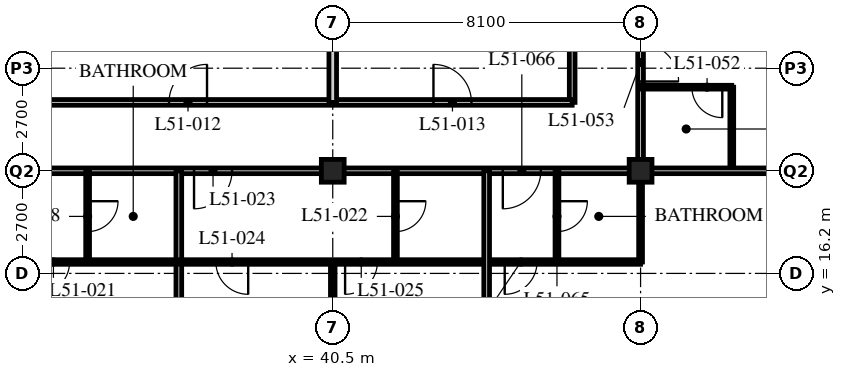
"""IFC4 building model, lengths in metres.
Left out: names, types, materials, properties, quantities, classifications, styles, units other than length and angle.
Written with IfcOpenShell. Run it as: python <this file> out.ifc"""

import sys

from ifc_helpers import new_model, si_unit, direction, frame, frame_2d, origin, origin_2d, place, context, subcontext, project, spatial, rectangle, hollow_rectangle, extrude, element, fill, save


model = new_model("IFC4")
c1 = context("Model", 3, precision=1e-05, world=origin(), true_north=direction((0.0, 1.0)))
c2 = subcontext(c1, "Body", "Model", "MODEL_VIEW")
j1 = project(units=[si_unit("LENGTHUNIT", "METRE"), si_unit("PLANEANGLEUNIT", "RADIAN")], contexts=[c1])
p1 = place(None, origin())
s1 = spatial("IfcSite", under=j1, at=p1, CompositionType="ELEMENT")
p2 = place(p1, origin())
s2 = spatial("IfcBuilding", under=s1, at=p2, CompositionType="ELEMENT")
p3 = place(p2, frame((0.0, 0.0, 199.2)))
s3 = spatial("IfcBuildingStorey", under=s2, at=p3, CompositionType="ELEMENT", Elevation=199.2)
for number, where, z_axis, x_axis in (
    (1, (40.5, 18.9, 0.0), (0.0, 0.0, 1.0), (1.0, 0.0, 0.0)),
    (2, (48.6, 18.9, 0.0), (0.0, 0.0, 1.0), (1.0, 0.0, 0.0)),
):
    element("IfcColumn", number, at=place(p3, frame(where, z_axis=z_axis, x_axis=x_axis)), inside=s3, PredefinedType="COLUMN", context=c2, shape_type="SweptSolid", body=[
        extrude(hollow_rectangle(XDim=0.6, YDim=0.6, WallThickness=0.05, at=origin_2d()), origin(), (0.0, 0.0, 1.0), 3.6),
    ])
p4 = place(p3, frame((8.1, 18.9, 0.0), z_axis=(0.0, 0.0, 1.0), x_axis=(1.0, 0.0, 0.0)))
e3 = element("IfcWall", 3, at=p4, inside=s3, PredefinedType="PARTITIONING", context=c2, shape_type="SweptSolid", body=[
    extrude(rectangle(XDim=40.5, YDim=0.15, at=frame_2d((20.25, 0.0))), origin(), (0.0, 0.0, 1.0), 2.778),
])
p5 = place(p4, frame((4.45, 0.0, 0.0)))
e4 = element("IfcOpeningElement", 4, at=p5, cuts=e3, PredefinedType="OPENING", context=c2, shape_type="SweptSolid", body=[
    extrude(rectangle(XDim=1.0, YDim=2.1, at=frame_2d((0.5, 1.05))), frame((0.0, 0.085, 0.0), z_axis=(0.0, -1.0, 0.0), x_axis=(1.0, 0.0, 0.0)), (0.0, 0.0, 1.0), 0.17),
])
p6 = place(p4, frame((17.1, 0.0, 0.0)))
e5 = element("IfcOpeningElement", 5, at=p6, cuts=e3, PredefinedType="OPENING", context=c2, shape_type="SweptSolid", body=[
    extrude(rectangle(XDim=1.0, YDim=2.1, at=frame_2d((0.5, 1.05))), frame((0.0, 0.085, 0.0), z_axis=(0.0, -1.0, 0.0), x_axis=(1.0, 0.0, 0.0)), (0.0, 0.0, 1.0), 0.17),
])
p7 = place(p4, frame((28.75, 0.0, 0.0)))
e6 = element("IfcOpeningElement", 6, at=p7, cuts=e3, PredefinedType="OPENING", context=c2, shape_type="SweptSolid", body=[
    extrude(rectangle(XDim=1.0, YDim=2.1, at=frame_2d((0.5, 1.05))), frame((0.0, 0.085, 0.0), z_axis=(0.0, -1.0, 0.0), x_axis=(1.0, 0.0, 0.0)), (0.0, 0.0, 1.0), 0.17),
])
p8 = place(p4, frame((2.625, 0.0, 0.0)))
e7 = element("IfcOpeningElement", 7, at=p8, cuts=e3, PredefinedType="OPENING", context=c2, shape_type="SweptSolid", body=[
    extrude(rectangle(XDim=1.0, YDim=2.1, at=frame_2d((0.5, 1.05))), frame((0.0, 0.085, 0.0), z_axis=(0.0, -1.0, 0.0), x_axis=(1.0, 0.0, 0.0)), (0.0, 0.0, 1.0), 0.17),
])
p9 = place(p4, frame((36.875, 0.0, 0.0)))
e8 = element("IfcOpeningElement", 8, at=p9, cuts=e3, PredefinedType="OPENING", context=c2, shape_type="SweptSolid", body=[
    extrude(rectangle(XDim=1.0, YDim=2.1, at=frame_2d((0.5, 1.05))), frame((0.0, 0.085, 0.0), z_axis=(0.0, -1.0, 0.0), x_axis=(1.0, 0.0, 0.0)), (0.0, 0.0, 1.0), 0.17),
])
p10 = place(p3, frame((48.6, 18.9, 0.0), z_axis=(0.0, 0.0, 1.0), x_axis=(0.0, 1.0, 0.0)))
e9 = element("IfcWall", 9, at=p10, inside=s3, PredefinedType="PARTITIONING", context=c2, shape_type="SweptSolid", body=[
    extrude(rectangle(XDim=24.3, YDim=0.15, at=frame_2d((12.15, 0.0))), origin(), (0.0, 0.0, 1.0), 2.778),
])
p11 = place(p10, frame((2.35, 0.0, 0.0)))
e10 = element("IfcOpeningElement", 10, at=p11, cuts=e9, PredefinedType="OPENING", context=c2, shape_type="SweptSolid", body=[
    extrude(rectangle(XDim=1.0, YDim=2.1, at=frame_2d((0.5, 1.05))), frame((0.0, 0.085, 0.0), z_axis=(0.0, -1.0, 0.0), x_axis=(1.0, 0.0, 0.0)), (0.0, 0.0, 1.0), 0.17),
])
p12 = place(p10, frame((4.75, 0.0, 0.0)))
e11 = element("IfcOpeningElement", 11, at=p12, cuts=e9, PredefinedType="OPENING", context=c2, shape_type="SweptSolid", body=[
    extrude(rectangle(XDim=1.0, YDim=2.1, at=frame_2d((0.5, 1.05))), frame((0.0, 0.085, 0.0), z_axis=(0.0, -1.0, 0.0), x_axis=(1.0, 0.0, 0.0)), (0.0, 0.0, 1.0), 0.17),
])
p13 = place(p10, frame((9.0, 0.0, 0.0)))
e12 = element("IfcOpeningElement", 12, at=p13, cuts=e9, PredefinedType="OPENING", context=c2, shape_type="SweptSolid", body=[
    extrude(rectangle(XDim=1.0, YDim=2.1, at=frame_2d((0.5, 1.05))), frame((0.0, 0.085, 0.0), z_axis=(0.0, -1.0, 0.0), x_axis=(1.0, 0.0, 0.0)), (0.0, 0.0, 1.0), 0.17),
])
p14 = place(p3, frame((46.8, 20.7, 0.0), z_axis=(0.0, 0.0, 1.0), x_axis=(0.0, 1.0, 0.0)))
e13 = element("IfcWall", 13, at=p14, inside=s3, PredefinedType="PARTITIONING", context=c2, shape_type="SweptSolid", body=[
    extrude(rectangle(XDim=19.8, YDim=0.15, at=frame_2d((9.9, 0.0))), origin(), (0.0, 0.0, 1.0), 3.39),
])
p15 = place(p14, frame((4.052, 0.0, 0.0)))
e14 = element("IfcOpeningElement", 14, at=p15, cuts=e13, PredefinedType="OPENING", context=c2, shape_type="SweptSolid", body=[
    extrude(rectangle(XDim=1.0, YDim=2.1, at=frame_2d((0.5, 1.05))), frame((0.0, 0.085, 0.0), z_axis=(0.0, -1.0, 0.0), x_axis=(1.0, 0.0, 0.0)), (0.0, 0.0, 1.0), 0.17),
])
p16 = place(p14, frame((8.102, 0.0, 0.0)))
e15 = element("IfcOpeningElement", 15, at=p16, cuts=e13, PredefinedType="OPENING", context=c2, shape_type="SweptSolid", body=[
    extrude(rectangle(XDim=1.0, YDim=2.1, at=frame_2d((0.5, 1.05))), frame((0.0, 0.085, 0.0), z_axis=(0.0, -1.0, 0.0), x_axis=(1.0, 0.0, 0.0)), (0.0, 0.0, 1.0), 0.17),
])
p17 = place(p14, frame((13.502, 0.0, 0.0)))
e16 = element("IfcOpeningElement", 16, at=p17, cuts=e13, PredefinedType="OPENING", context=c2, shape_type="SweptSolid", body=[
    extrude(rectangle(XDim=1.0, YDim=2.1, at=frame_2d((0.5, 1.05))), frame((0.0, 0.085, 0.0), z_axis=(0.0, -1.0, 0.0), x_axis=(1.0, 0.0, 0.0)), (0.0, 0.0, 1.0), 0.17),
])
p18 = place(p14, frame((17.552, 0.0, 0.0)))
e17 = element("IfcOpeningElement", 17, at=p18, cuts=e13, PredefinedType="OPENING", context=c2, shape_type="SweptSolid", body=[
    extrude(rectangle(XDim=1.0, YDim=2.1, at=frame_2d((0.5, 1.05))), frame((0.0, 0.085, 0.0), z_axis=(0.0, -1.0, 0.0), x_axis=(1.0, 0.0, 0.0)), (0.0, 0.0, 1.0), 0.17),
])
p19 = place(p3, frame((29.56, 20.7, 0.0), z_axis=(0.0, 0.0, 1.0), x_axis=(1.0, 0.0, 0.0)))
e18 = element("IfcWall", 18, at=p19, inside=s3, PredefinedType="PARTITIONING", context=c2, shape_type="SweptSolid", body=[
    extrude(rectangle(XDim=17.24, YDim=0.15, at=frame_2d((8.62, 0.0))), origin(), (0.0, 0.0, 1.0), 3.39),
])
p20 = place(p19, frame((1.157, 0.0, 0.0)))
e19 = element("IfcOpeningElement", 19, at=p20, cuts=e18, PredefinedType="OPENING", context=c2, shape_type="SweptSolid", body=[
    extrude(rectangle(XDim=1.0, YDim=2.1, at=frame_2d((0.5, 1.05))), frame((0.0, 0.085, 0.0), z_axis=(0.0, -1.0, 0.0), x_axis=(1.0, 0.0, 0.0)), (0.0, 0.0, 1.0), 0.17),
])
p21 = place(p19, frame((6.632, 0.0, 0.0)))
e20 = element("IfcOpeningElement", 20, at=p21, cuts=e18, PredefinedType="OPENING", context=c2, shape_type="SweptSolid", body=[
    extrude(rectangle(XDim=1.0, YDim=2.1, at=frame_2d((0.5, 1.05))), frame((0.0, 0.085, 0.0), z_axis=(0.0, -1.0, 0.0), x_axis=(1.0, 0.0, 0.0)), (0.0, 0.0, 1.0), 0.17),
])
p22 = place(p19, frame((13.59, 0.0, 0.0)))
e21 = element("IfcOpeningElement", 21, at=p22, cuts=e18, PredefinedType="OPENING", context=c2, shape_type="SweptSolid", body=[
    extrude(rectangle(XDim=1.0, YDim=2.1, at=frame_2d((0.5, 1.05))), frame((0.0, 0.085, 0.0), z_axis=(0.0, -1.0, 0.0), x_axis=(1.0, 0.0, 0.0)), (0.0, 0.0, 1.0), 0.17),
])
p23 = place(p3, frame((40.5, 20.7, 0.0), z_axis=(0.0, 0.0, 1.0), x_axis=(0.0, 1.0, 0.0)))
e22 = element("IfcWall", 22, at=p23, inside=s3, PredefinedType="SOLIDWALL", context=c2, shape_type="SweptSolid", body=[
    extrude(rectangle(XDim=3.6, YDim=0.2, at=frame_2d((1.8, 0.0))), origin(), (0.0, 0.0, 1.0), 2.778),
])
p24 = place(p3, frame((34.05, 18.9, 0.0), z_axis=(0.0, 0.0, 1.0), x_axis=(0.0, -1.0, 0.0)))
e23 = element("IfcWall", 23, at=p24, inside=s3, PredefinedType="PARTITIONING", context=c2, shape_type="SweptSolid", body=[
    extrude(rectangle(XDim=2.4, YDim=0.1, at=frame_2d((1.2, 0.0))), origin(), (0.0, 0.0, 1.0), 3.39),
])
p25 = place(p24, frame((0.8, 0.0, 0.0)))
e24 = element("IfcOpeningElement", 24, at=p25, cuts=e23, PredefinedType="OPENING", context=c2, shape_type="SweptSolid", body=[
    extrude(rectangle(XDim=0.8, YDim=2.1, at=frame_2d((0.4, 1.05))), frame((0.0, 0.06, 0.0), z_axis=(0.0, -1.0, 0.0), x_axis=(1.0, 0.0, 0.0)), (0.0, 0.0, 1.0), 0.12),
])
p26 = place(p3, frame((36.45, 18.9, 0.0), z_axis=(0.0, 0.0, 1.0), x_axis=(0.0, -1.0, 0.0)))
e25 = element("IfcWall", 25, at=p26, inside=s3, PredefinedType="PARTITIONING", context=c2, shape_type="SweptSolid", body=[
    extrude(rectangle(XDim=7.8, YDim=0.15, at=frame_2d((3.9, 0.0))), origin(), (0.0, 0.0, 1.0), 3.39),
])
p27 = place(p3, frame((42.15, 18.9, 0.0), z_axis=(0.0, 0.0, 1.0), x_axis=(0.0, -1.0, 0.0)))
e26 = element("IfcWall", 26, at=p27, inside=s3, PredefinedType="PARTITIONING", context=c2, shape_type="SweptSolid", body=[
    extrude(rectangle(XDim=2.4, YDim=0.1, at=frame_2d((1.2, 0.0))), origin(), (0.0, 0.0, 1.0), 3.39),
])
p28 = place(p27, frame((0.8, 0.0, 0.0)))
e27 = element("IfcOpeningElement", 27, at=p28, cuts=e26, PredefinedType="OPENING", context=c2, shape_type="SweptSolid", body=[
    extrude(rectangle(XDim=0.8, YDim=2.1, at=frame_2d((0.4, 1.05))), frame((0.0, 0.06, 0.0), z_axis=(0.0, -1.0, 0.0), x_axis=(1.0, 0.0, 0.0)), (0.0, 0.0, 1.0), 0.12),
])
p29 = place(p3, frame((40.5, 16.5, 0.0), z_axis=(0.0, 0.0, 1.0), x_axis=(0.0, -1.0, 0.0)))
e28 = element("IfcWall", 28, at=p29, inside=s3, PredefinedType="PARTITIONING", context=c2, shape_type="SweptSolid", body=[
    extrude(rectangle(XDim=5.4, YDim=0.12, at=frame_2d((2.7, 0.0))), origin(), (0.0, 0.0, 1.0), 2.778),
])
p30 = place(p3, frame((51.0, 18.9, 0.0), z_axis=(0.0, 0.0, 1.0), x_axis=(0.0, 1.0, 0.0)))
e29 = element("IfcWall", 29, at=p30, inside=s3, PredefinedType="PARTITIONING", context=c2, shape_type="SweptSolid", body=[
    extrude(rectangle(XDim=2.2, YDim=0.1, at=frame_2d((1.1, 0.0))), origin(), (0.0, 0.0, 1.0), 3.39),
])
p31 = place(p3, frame((48.6, 21.1, 0.0), z_axis=(0.0, 0.0, 1.0), x_axis=(1.0, 0.0, 0.0)))
e30 = element("IfcWall", 30, at=p31, inside=s3, PredefinedType="PARTITIONING", context=c2, shape_type="SweptSolid", body=[
    extrude(rectangle(XDim=2.4, YDim=0.1, at=frame_2d((1.2, 0.0))), origin(), (0.0, 0.0, 1.0), 3.39),
])
p32 = place(p31, frame((1.35, 0.0, 0.0)))
e31 = element("IfcOpeningElement", 31, at=p32, cuts=e30, PredefinedType="OPENING", context=c2, shape_type="SweptSolid", body=[
    extrude(rectangle(XDim=0.8, YDim=2.1, at=frame_2d((0.4, 1.05))), frame((0.0, 0.06, 0.0), z_axis=(0.0, -1.0, 0.0), x_axis=(1.0, 0.0, 0.0)), (0.0, 0.0, 1.0), 0.12),
])
p33 = place(p3, frame((8.1, 16.5, 0.0), z_axis=(0.0, 0.0, 1.0), x_axis=(1.0, 0.0, 0.0)))
e32 = element("IfcWall", 32, at=p33, inside=s3, PredefinedType="PARTITIONING", context=c2, shape_type="SweptSolid", body=[
    extrude(rectangle(XDim=40.5, YDim=0.12, at=frame_2d((20.25, 0.0))), origin(), (0.0, 0.0, 1.0), 3.39),
])
p34 = place(p33, frame((5.025, 0.0, 0.0)))
e33 = element("IfcOpeningElement", 33, at=p34, cuts=e32, PredefinedType="OPENING", context=c2, shape_type="SweptSolid", body=[
    extrude(rectangle(XDim=0.85, YDim=2.1, at=frame_2d((0.425, 1.05))), frame((0.0, 0.07, 0.0), z_axis=(0.0, -1.0, 0.0), x_axis=(1.0, 0.0, 0.0)), (0.0, 0.0, 1.0), 0.14),
])
p35 = place(p33, frame((12.475, 0.0, 0.0)))
e34 = element("IfcOpeningElement", 34, at=p35, cuts=e32, PredefinedType="OPENING", context=c2, shape_type="SweptSolid", body=[
    extrude(rectangle(XDim=0.85, YDim=2.1, at=frame_2d((0.425, 1.05))), frame((0.0, 0.07, 0.0), z_axis=(0.0, -1.0, 0.0), x_axis=(1.0, 0.0, 0.0)), (0.0, 0.0, 1.0), 0.14),
])
p36 = place(p33, frame((17.175, 0.0, 0.0)))
e35 = element("IfcOpeningElement", 35, at=p36, cuts=e32, PredefinedType="OPENING", context=c2, shape_type="SweptSolid", body=[
    extrude(rectangle(XDim=0.85, YDim=2.1, at=frame_2d((0.425, 1.05))), frame((0.0, 0.07, 0.0), z_axis=(0.0, -1.0, 0.0), x_axis=(1.0, 0.0, 0.0)), (0.0, 0.0, 1.0), 0.14),
])
p37 = place(p33, frame((24.625, 0.0, 0.0)))
e36 = element("IfcOpeningElement", 36, at=p37, cuts=e32, PredefinedType="OPENING", context=c2, shape_type="SweptSolid", body=[
    extrude(rectangle(XDim=0.85, YDim=2.1, at=frame_2d((0.425, 1.05))), frame((0.0, 0.07, 0.0), z_axis=(0.0, -1.0, 0.0), x_axis=(1.0, 0.0, 0.0)), (0.0, 0.0, 1.0), 0.14),
])
p38 = place(p33, frame((29.325, 0.0, 0.0)))
e37 = element("IfcOpeningElement", 37, at=p38, cuts=e32, PredefinedType="OPENING", context=c2, shape_type="SweptSolid", body=[
    extrude(rectangle(XDim=0.85, YDim=2.1, at=frame_2d((0.425, 1.05))), frame((0.0, 0.07, 0.0), z_axis=(0.0, -1.0, 0.0), x_axis=(1.0, 0.0, 0.0)), (0.0, 0.0, 1.0), 0.14),
])
p39 = place(p33, frame((32.725, 0.0, 0.0)))
e38 = element("IfcOpeningElement", 38, at=p39, cuts=e32, PredefinedType="OPENING", context=c2, shape_type="SweptSolid", body=[
    extrude(rectangle(XDim=0.85, YDim=2.1, at=frame_2d((0.425, 1.05))), frame((0.0, 0.07, 0.0), z_axis=(0.0, -1.0, 0.0), x_axis=(1.0, 0.0, 0.0)), (0.0, 0.0, 1.0), 0.14),
])
p40 = place(p33, frame((2.725, 0.0, 0.0)))
e39 = element("IfcOpeningElement", 39, at=p40, cuts=e32, PredefinedType="OPENING", context=c2, shape_type="SweptSolid", body=[
    extrude(rectangle(XDim=0.85, YDim=2.1, at=frame_2d((0.425, 1.05))), frame((0.0, 0.07, 0.0), z_axis=(0.0, -1.0, 0.0), x_axis=(1.0, 0.0, 0.0)), (0.0, 0.0, 1.0), 0.14),
])
p41 = place(p33, frame((36.925, 0.0, 0.0)))
e40 = element("IfcOpeningElement", 40, at=p41, cuts=e32, PredefinedType="OPENING", context=c2, shape_type="SweptSolid", body=[
    extrude(rectangle(XDim=0.85, YDim=2.1, at=frame_2d((0.425, 1.05))), frame((0.0, 0.07, 0.0), z_axis=(0.0, -1.0, 0.0), x_axis=(1.0, 0.0, 0.0)), (0.0, 0.0, 1.0), 0.14),
])
p42 = place(p3, frame((46.4, 18.9, 0.0), z_axis=(0.0, 0.0, 1.0), x_axis=(0.0, -1.0, 0.0)))
e41 = element("IfcWall", 41, at=p42, inside=s3, PredefinedType="PARTITIONING", context=c2, shape_type="SweptSolid", body=[
    extrude(rectangle(XDim=2.4, YDim=0.1, at=frame_2d((1.2, 0.0))), origin(), (0.0, 0.0, 1.0), 3.39),
])
p43 = place(p42, frame((0.8, 0.0, 0.0)))
e42 = element("IfcOpeningElement", 42, at=p43, cuts=e41, PredefinedType="OPENING", context=c2, shape_type="SweptSolid", body=[
    extrude(rectangle(XDim=0.8, YDim=2.1, at=frame_2d((0.4, 1.05))), frame((0.0, 0.06, 0.0), z_axis=(0.0, -1.0, 0.0), x_axis=(1.0, 0.0, 0.0)), (0.0, 0.0, 1.0), 0.12),
])
p44 = place(p3, frame((48.6, 18.9, 0.0), z_axis=(0.0, 0.0, 1.0), x_axis=(0.0, -1.0, 0.0)))
e43 = element("IfcWall", 43, at=p44, inside=s3, PredefinedType="PARTITIONING", context=c2, shape_type="SweptSolid", body=[
    extrude(rectangle(XDim=2.4, YDim=0.1, at=frame_2d((1.2, 0.0))), origin(), (0.0, 0.0, 1.0), 2.778),
])
p45 = place(p3, frame((48.6, 18.9, 0.0), z_axis=(0.0, 0.0, 1.0), x_axis=(1.0, 0.0, 0.0)))
e44 = element("IfcWall", 44, at=p45, inside=s3, PredefinedType="PARTITIONING", context=c2, shape_type="SweptSolid", body=[
    extrude(rectangle(XDim=3.75, YDim=0.15, at=frame_2d((1.875, 0.0))), origin(), (0.0, 0.0, 1.0), 2.778),
])
p46 = place(p3, frame((44.55, 18.9, 0.0), z_axis=(0.0, 0.0, 1.0), x_axis=(0.0, -1.0, 0.0)))
e45 = element("IfcWall", 45, at=p46, inside=s3, PredefinedType="PARTITIONING", context=c2, shape_type="SweptSolid", body=[
    extrude(rectangle(XDim=7.8, YDim=0.15, at=frame_2d((3.9, 0.0))), origin(), (0.0, 0.0, 1.0), 3.39),
])
p47 = place(p21, origin())
e46 = element("IfcDoor", 46, at=p47, inside=s3, OperationType="SINGLE_SWING_RIGHT", PredefinedType="DOOR", context=c2, shape_type="SweptSolid", body=[
    extrude(rectangle(XDim=1.0, YDim=2.1, at=frame_2d((0.5, 1.05))), frame((0.0, 0.025, 0.0), z_axis=(0.0, -1.0, 0.0), x_axis=(1.0, 0.0, 0.0)), (0.0, 0.0, 1.0), 0.05),
])
fill(e20, e46)
p48 = place(p22, origin())
e47 = element("IfcDoor", 47, at=p48, inside=s3, OperationType="SINGLE_SWING_LEFT", PredefinedType="DOOR", context=c2, shape_type="SweptSolid", body=[
    extrude(rectangle(XDim=1.0, YDim=2.1, at=frame_2d((0.5, 1.05))), frame((0.0, 0.025, 0.0), z_axis=(0.0, -1.0, 0.0), x_axis=(1.0, 0.0, 0.0)), (0.0, 0.0, 1.0), 0.05),
])
fill(e21, e47)
p49 = place(p25, origin())
e48 = element("IfcDoor", 48, at=p49, inside=s3, OperationType="SINGLE_SWING_LEFT", PredefinedType="DOOR", context=c2, shape_type="SweptSolid", body=[
    extrude(rectangle(XDim=0.8, YDim=2.1, at=frame_2d((0.4, 1.05))), frame((0.0, 0.025, 0.0), z_axis=(0.0, -1.0, 0.0), x_axis=(1.0, 0.0, 0.0)), (0.0, 0.0, 1.0), 0.05),
])
fill(e24, e48)
p50 = place(p37, origin())
e49 = element("IfcDoor", 49, at=p50, inside=s3, OperationType="SINGLE_SWING_RIGHT", PredefinedType="DOOR", context=c2, shape_type="SweptSolid", body=[
    extrude(rectangle(XDim=0.85, YDim=2.1, at=frame_2d((0.425, 1.05))), frame((0.0, 0.025, 0.0), z_axis=(0.0, -1.0, 0.0), x_axis=(1.0, 0.0, 0.0)), (0.0, 0.0, 1.0), 0.05),
])
fill(e36, e49)
p51 = place(p28, origin())
e50 = element("IfcDoor", 50, at=p51, inside=s3, OperationType="SINGLE_SWING_LEFT", PredefinedType="DOOR", context=c2, shape_type="SweptSolid", body=[
    extrude(rectangle(XDim=0.8, YDim=2.1, at=frame_2d((0.4, 1.05))), frame((0.0, 0.025, 0.0), z_axis=(0.0, -1.0, 0.0), x_axis=(1.0, 0.0, 0.0)), (0.0, 0.0, 1.0), 0.05),
])
fill(e27, e50)
p52 = place(p7, origin())
e51 = element("IfcDoor", 51, at=p52, inside=s3, OperationType="SINGLE_SWING_RIGHT", PredefinedType="DOOR", context=c2, shape_type="SweptSolid", body=[
    extrude(rectangle(XDim=1.0, YDim=2.1, at=frame_2d((0.5, 1.05))), frame((0.0, 0.025, 0.0), z_axis=(0.0, -1.0, 0.0), x_axis=(1.0, 0.0, 0.0)), (0.0, 0.0, 1.0), 0.05),
])
fill(e6, e51)
p53 = place(p38, origin())
e52 = element("IfcDoor", 52, at=p53, inside=s3, OperationType="SINGLE_SWING_LEFT", PredefinedType="DOOR", context=c2, shape_type="SweptSolid", body=[
    extrude(rectangle(XDim=0.85, YDim=2.1, at=frame_2d((0.425, 1.05))), frame((0.0, 0.025, 0.0), z_axis=(0.0, -1.0, 0.0), x_axis=(1.0, 0.0, 0.0)), (0.0, 0.0, 1.0), 0.05),
])
fill(e37, e52)
p54 = place(p39, origin())
e53 = element("IfcDoor", 53, at=p54, inside=s3, OperationType="SINGLE_SWING_RIGHT", PredefinedType="DOOR", context=c2, shape_type="SweptSolid", body=[
    extrude(rectangle(XDim=0.85, YDim=2.1, at=frame_2d((0.425, 1.05))), frame((0.0, 0.025, 0.0), z_axis=(0.0, -1.0, 0.0), x_axis=(1.0, 0.0, 0.0)), (0.0, 0.0, 1.0), 0.05),
])
fill(e38, e53)
p55 = place(p32, origin())
e54 = element("IfcDoor", 54, at=p55, inside=s3, OperationType="SINGLE_SWING_LEFT", PredefinedType="DOOR", context=c2, shape_type="SweptSolid", body=[
    extrude(rectangle(XDim=0.8, YDim=2.1, at=frame_2d((0.4, 1.05))), frame((0.0, 0.025, 0.0), z_axis=(0.0, -1.0, 0.0), x_axis=(1.0, 0.0, 0.0)), (0.0, 0.0, 1.0), 0.05),
])
fill(e31, e54)
p56 = place(p11, origin())
e55 = element("IfcDoor", 55, at=p56, inside=s3, OperationType="SINGLE_SWING_RIGHT", PredefinedType="DOOR", context=c2, shape_type="SweptSolid", body=[
    extrude(rectangle(XDim=1.0, YDim=2.1, at=frame_2d((0.5, 1.05))), frame((0.0, 0.025, 0.0), z_axis=(0.0, -1.0, 0.0), x_axis=(1.0, 0.0, 0.0)), (0.0, 0.0, 1.0), 0.05),
])
fill(e10, e55)
p57 = place(p43, origin())
e56 = element("IfcDoor", 56, at=p57, inside=s3, OperationType="SINGLE_SWING_LEFT", PredefinedType="DOOR", context=c2, shape_type="SweptSolid", body=[
    extrude(rectangle(XDim=0.8, YDim=2.1, at=frame_2d((0.4, 1.05))), frame((0.0, 0.025, 0.0), z_axis=(0.0, -1.0, 0.0), x_axis=(1.0, 0.0, 0.0)), (0.0, 0.0, 1.0), 0.05),
])
fill(e42, e56)
p58 = place(p9, origin())
e57 = element("IfcDoor", 57, at=p58, inside=s3, OperationType="SINGLE_SWING_RIGHT", PredefinedType="DOOR", context=c2, shape_type="SweptSolid", body=[
    extrude(rectangle(XDim=1.0, YDim=2.1, at=frame_2d((0.5, 1.05))), frame((0.0, 0.025, 0.0), z_axis=(0.0, -1.0, 0.0), x_axis=(1.0, 0.0, 0.0)), (0.0, 0.0, 1.0), 0.05),
])
fill(e8, e57)
p59 = place(p41, origin())
e58 = element("IfcDoor", 58, at=p59, inside=s3, OperationType="SINGLE_SWING_RIGHT", PredefinedType="DOOR", context=c2, shape_type="SweptSolid", body=[
    extrude(rectangle(XDim=0.85, YDim=2.1, at=frame_2d((0.425, 1.05))), frame((0.0, 0.025, 0.0), z_axis=(0.0, -1.0, 0.0), x_axis=(1.0, 0.0, 0.0)), (0.0, 0.0, 1.0), 0.05),
])
fill(e40, e58)
save(model, sys.argv[1])
